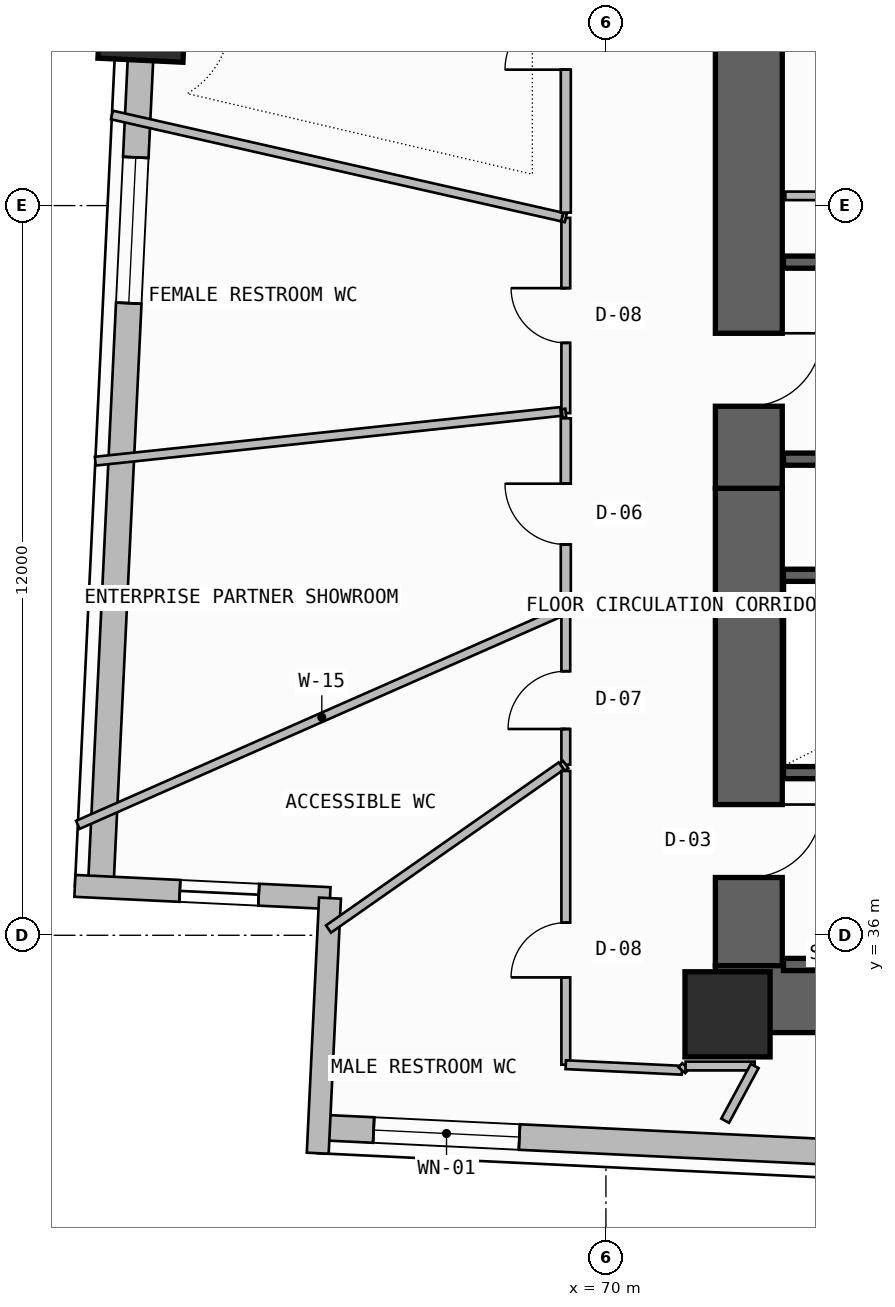
"""IFC4 building model, lengths in metres.
Left out: names, types, materials, properties, quantities, classifications, styles, units other than length and angle.
Written with IfcOpenShell. Run it as: python <this file> out.ifc"""

import sys

from ifc_helpers import new_model, si_unit, direction, frame, frame_2d, origin, origin_2d, place, context, subcontext, project, spatial, rectangle, extrude, element, fill, save


model = new_model("IFC4")
c1 = context("Model", 3, precision=1e-05, world=origin(), true_north=direction((0.0, 1.0)))
c2 = subcontext(c1, "Body", "Model", "MODEL_VIEW")
j1 = project(units=[si_unit("LENGTHUNIT", "METRE"), si_unit("PLANEANGLEUNIT", "RADIAN")], contexts=[c1])
p1 = place(None, origin())
s1 = spatial("IfcSite", under=j1, at=p1, CompositionType="ELEMENT")
p2 = place(p1, origin())
s2 = spatial("IfcBuilding", under=s1, at=p2, CompositionType="ELEMENT")
p3 = place(p2, frame((0.0, 0.0, 44.7)))
s3 = spatial("IfcBuildingStorey", under=s2, at=p3, CompositionType="ELEMENT", Elevation=44.7)
p4 = place(p3, frame((72.35, 35.5, -0.2), z_axis=(0.0, 0.0, 1.0), x_axis=(0.0, 1.0, 0.0)))
e1 = element("IfcWall", 1, at=p4, inside=s3, PredefinedType="SHEAR", context=c2, shape_type="SweptSolid", body=[
    extrude(rectangle(XDim=7.85, YDim=1.1, at=frame_2d((3.925, 0.0))), origin(), (0.0, 0.0, 1.0), 3.54),
])
p5 = place(p4, frame((1.45, 0.0, 0.2)))
e2 = element("IfcOpeningElement", 2, at=p5, cuts=e1, PredefinedType="OPENING", context=c2, shape_type="SweptSolid", body=[
    extrude(rectangle(XDim=1.2, YDim=2.2, at=frame_2d((0.6, 1.1))), frame((0.0, 0.56, 0.0), z_axis=(0.0, -1.0, 0.0), x_axis=(1.0, 0.0, 0.0)), (0.0, 0.0, 1.0), 1.12),
])
p6 = place(p3, frame((71.8, 34.95, -0.2), z_axis=(0.0, 0.0, 1.0), x_axis=(1.0, 0.0, 0.0)))
e3 = element("IfcWall", 3, at=p6, inside=s3, PredefinedType="SHEAR", context=c2, shape_type="SweptSolid", body=[
    extrude(rectangle(XDim=14.3, YDim=1.1, at=frame_2d((7.15, 0.0))), origin(), (0.0, 0.0, 1.0), 3.54),
])
p7 = place(p3, frame((72.35, 43.35, -0.2), z_axis=(0.0, 0.0, 1.0), x_axis=(0.0, 1.0, 0.0)))
e4 = element("IfcWall", 4, at=p7, inside=s3, PredefinedType="SHEAR", context=c2, shape_type="SweptSolid", body=[
    extrude(rectangle(XDim=12.7, YDim=1.1, at=frame_2d((6.35, 0.0))), origin(), (0.0, 0.0, 1.0), 3.54),
])
p8 = place(p7, frame((1.35, 0.0, 0.2)))
e5 = element("IfcOpeningElement", 5, at=p8, cuts=e4, PredefinedType="OPENING", context=c2, shape_type="SweptSolid", body=[
    extrude(rectangle(XDim=1.2, YDim=2.2, at=frame_2d((0.6, 1.1))), frame((0.0, 0.56, 0.0), z_axis=(0.0, -1.0, 0.0), x_axis=(1.0, 0.0, 0.0)), (0.0, 0.0, 1.0), 1.12),
])
for number, where, z_axis, x_axis in (
    (6, (72.0, 34.7, 0.0), (0.0, 0.0, 1.0), (1.0, 0.0, 0.0)),
    (7, (62.378, 51.09, 0.0), (0.0, 0.0, 1.0), (0.048, 0.999, 0.0)),
):
    element("IfcColumn", number, at=place(p3, frame(where, z_axis=z_axis, x_axis=x_axis)), inside=s3, PredefinedType="COLUMN", context=c2, shape_type="SweptSolid", body=[
        extrude(rectangle(XDim=1.4, YDim=1.4, at=origin_2d()), origin(), (0.0, 0.0, 1.0), 3.6),
    ])
p9 = place(p3, frame((65.281, 32.841, 0.0), z_axis=(0.0, 0.0, 1.0), x_axis=(0.998848298084, -0.047979968897, 0.0)))
e8 = element("IfcWall", 8, at=p9, inside=s3, PredefinedType="SOLIDWALL", context=c2, shape_type="SweptSolid", body=[
    extrude(rectangle(XDim=17.952, YDim=0.42, at=frame_2d((8.976, 0.0))), origin(), (0.0, 0.0, 1.0), 2.325),
])
p10 = place(p9, frame((0.9, 0.0, 1.2)))
e9 = element("IfcOpeningElement", 9, at=p10, cuts=e8, PredefinedType="OPENING", context=c2, shape_type="SweptSolid", body=[
    extrude(rectangle(XDim=2.4, YDim=0.9, at=frame_2d((1.2, 0.45))), frame((0.0, 0.22, 0.0), z_axis=(0.0, -1.0, 0.0), x_axis=(1.0, 0.0, 0.0)), (0.0, 0.0, 1.0), 0.44),
])
p11 = place(p3, frame((62.378, 51.09, 0.0), z_axis=(0.0, 0.0, 1.0), x_axis=(-0.047978424452, -0.99884837227, 0.0)))
e10 = element("IfcWall", 10, at=p11, inside=s3, PredefinedType="SOLIDWALL", context=c2, shape_type="SweptSolid", body=[
    extrude(rectangle(XDim=14.314, YDim=0.42, at=frame_2d((7.157, 0.0))), origin(), (0.0, 0.0, 1.0), 2.325),
])
p12 = place(p11, frame((2.3, 0.0, 1.2)))
e11 = element("IfcOpeningElement", 11, at=p12, cuts=e10, PredefinedType="OPENING", context=c2, shape_type="SweptSolid", body=[
    extrude(rectangle(XDim=2.4, YDim=0.9, at=frame_2d((1.2, 0.45))), frame((0.0, 0.22, 0.0), z_axis=(0.0, -1.0, 0.0), x_axis=(1.0, 0.0, 0.0)), (0.0, 0.0, 1.0), 0.44),
])
p13 = place(p3, frame((61.267, 36.812, 0.0), z_axis=(0.0, 0.0, 1.0), x_axis=(0.998849519138, -0.047954542207, 0.0)))
e12 = element("IfcWall", 12, at=p13, inside=s3, PredefinedType="SOLIDWALL", context=c2, shape_type="SweptSolid", body=[
    extrude(rectangle(XDim=4.2, YDim=0.36, at=frame_2d((2.1, 0.0))), origin(), (0.0, 0.0, 1.0), 3.34),
])
p14 = place(p13, frame((1.728, 0.0, 0.45)))
e13 = element("IfcOpeningElement", 13, at=p14, cuts=e12, PredefinedType="OPENING", context=c2, shape_type="SweptSolid", body=[
    extrude(rectangle(XDim=1.3, YDim=2.4, at=frame_2d((0.65, 1.2))), frame((0.0, 0.19, 0.0), z_axis=(0.0, -1.0, 0.0), x_axis=(1.0, 0.0, 0.0)), (0.0, 0.0, 1.0), 0.38),
])
p15 = place(p3, frame((65.462, 36.611, 0.0), z_axis=(0.0, 0.0, 1.0), x_axis=(-0.048015322758, -0.998846599224, 0.0)))
e14 = element("IfcWall", 14, at=p15, inside=s3, PredefinedType="SOLIDWALL", context=c2, shape_type="SweptSolid", body=[
    extrude(rectangle(XDim=4.2, YDim=0.36, at=frame_2d((2.1, 0.0))), origin(), (0.0, 0.0, 1.0), 3.34),
])
for number, where, z_axis, x_axis in (
    (15, (72.92, 35.52, -0.2), (0.0, 0.0, 1.0), (1.0, 0.0, 0.0)),
    (16, (72.92, 38.675, -0.2), (0.0, 0.0, 1.0), (1.0, 0.0, 0.0)),
):
    element("IfcWall", number, at=place(p3, frame(where, z_axis=z_axis, x_axis=x_axis)), inside=s3, PredefinedType="SOLIDWALL", context=c2, shape_type="SweptSolid", body=[
        extrude(rectangle(XDim=7.7, YDim=0.2, at=frame_2d((3.85, 0.0))), origin(), (0.0, 0.0, 1.0), 3.54),
    ])
p16 = place(p3, frame((72.92, 41.92, -0.2), z_axis=(0.0, 0.0, 1.0), x_axis=(1.0, 0.0, 0.0)))
e17 = element("IfcWall", 17, at=p16, inside=s3, PredefinedType="SOLIDWALL", context=c2, shape_type="SweptSolid", body=[
    extrude(rectangle(XDim=7.58, YDim=0.2, at=frame_2d((3.79, 0.0))), origin(), (0.0, 0.0, 1.0), 3.54),
])
for number, where, z_axis, x_axis in (
    (18, (72.92, 43.83, -0.2), (0.0, 0.0, 1.0), (1.0, 0.0, 0.0)),
    (19, (72.92, 47.07, -0.2), (0.0, 0.0, 1.0), (1.0, 0.0, 0.0)),
):
    element("IfcWall", number, at=place(p3, frame(where, z_axis=z_axis, x_axis=x_axis)), inside=s3, PredefinedType="SOLIDWALL", context=c2, shape_type="SweptSolid", body=[
        extrude(rectangle(XDim=7.7, YDim=0.2, at=frame_2d((3.85, 0.0))), origin(), (0.0, 0.0, 1.0), 3.54),
    ])
p17 = place(p3, frame((72.95, 48.16, 0.0), z_axis=(0.0, 0.0, 1.0), x_axis=(1.0, 0.0, 0.0)))
e20 = element("IfcWall", 20, at=p17, inside=s3, PredefinedType="PLUMBINGWALL", context=c2, shape_type="SweptSolid", body=[
    extrude(rectangle(XDim=3.24, YDim=0.14, at=frame_2d((1.62, 0.0))), origin(), (0.0, 0.0, 1.0), 3.34),
])
p18 = place(p3, frame((69.34, 47.798, 0.0), z_axis=(0.0, 0.0, 1.0), x_axis=(0.0, -1.0, 0.0)))
e21 = element("IfcWall", 21, at=p18, inside=s3, PredefinedType="PARTITIONING", context=c2, shape_type="SweptSolid", body=[
    extrude(rectangle(XDim=3.211, YDim=0.145, at=frame_2d((1.605, 0.0))), origin(), (0.0, 0.0, 1.0), 3.34),
])
p19 = place(p18, frame((1.156, 0.0, 0.0)))
e22 = element("IfcOpeningElement", 22, at=p19, cuts=e21, PredefinedType="OPENING", context=c2, shape_type="SweptSolid", body=[
    extrude(rectangle(XDim=0.9, YDim=2.1, at=frame_2d((0.45, 1.05))), frame((0.0, 0.083, 0.0), z_axis=(0.0, -1.0, 0.0), x_axis=(1.0, 0.0, 0.0)), (0.0, 0.0, 1.0), 0.165),
])
p20 = place(p3, frame((69.28, 47.812, 0.0), z_axis=(0.0, 0.0, 1.0), x_axis=(0.974190578374, -0.225727085233, 0.0)))
e23 = element("IfcWall", 23, at=p20, inside=s3, PredefinedType="PARTITIONING", context=c2, shape_type="SweptSolid", body=[
    extrude(rectangle(XDim=0.062, YDim=0.145, at=frame_2d((0.031, 0.0))), origin(), (0.0, 0.0, 1.0), 3.34),
])
p21 = place(p3, frame((69.34, 44.587, 0.0), z_axis=(0.0, 0.0, 1.0), x_axis=(-0.994030677348, -0.109100928002, 0.0)))
e24 = element("IfcWall", 24, at=p21, inside=s3, PredefinedType="PARTITIONING", context=c2, shape_type="SweptSolid", body=[
    extrude(rectangle(XDim=0.06, YDim=0.145, at=frame_2d((0.03, 0.0))), origin(), (0.0, 0.0, 1.0), 3.34),
])
p22 = place(p3, frame((69.256, 44.614, 0.0), z_axis=(0.0, 0.0, 1.0), x_axis=(-0.994351793686, -0.106134397782, 0.0)))
e25 = element("IfcWall", 25, at=p22, inside=s3, PredefinedType="PARTITIONING", context=c2, shape_type="SweptSolid", body=[
    extrude(rectangle(XDim=7.697, YDim=0.145, at=frame_2d((3.848, 0.0))), origin(), (0.0, 0.0, 1.0), 3.34),
])
p23 = place(p3, frame((61.875, 49.49, 0.0), z_axis=(0.0, 0.0, 1.0), x_axis=(0.975255899725, -0.221079013143, 0.0)))
e26 = element("IfcWall", 26, at=p23, inside=s3, PredefinedType="PARTITIONING", context=c2, shape_type="SweptSolid", body=[
    extrude(rectangle(XDim=7.592, YDim=0.145, at=frame_2d((3.796, 0.0))), origin(), (0.0, 0.0, 1.0), 3.34),
])
p24 = place(p3, frame((69.34, 44.502, 0.0), z_axis=(0.0, 0.0, 1.0), x_axis=(0.0, -1.0, 0.0)))
e27 = element("IfcWall", 27, at=p24, inside=s3, PredefinedType="PARTITIONING", context=c2, shape_type="SweptSolid", body=[
    extrude(rectangle(XDim=3.15, YDim=0.165, at=frame_2d((1.575, 0.0))), origin(), (0.0, 0.0, 1.0), 3.34),
])
p25 = place(p24, frame((1.075, 0.0, 0.0)))
e28 = element("IfcOpeningElement", 28, at=p25, cuts=e27, PredefinedType="OPENING", context=c2, shape_type="SweptSolid", body=[
    extrude(rectangle(XDim=1.0, YDim=2.2, at=frame_2d((0.5, 1.1))), frame((0.0, 0.093, 0.0), z_axis=(0.0, -1.0, 0.0), x_axis=(1.0, 0.0, 0.0)), (0.0, 0.0, 1.0), 0.185),
])
p26 = place(p3, frame((69.34, 41.352, 0.0), z_axis=(0.0, 0.0, 1.0), x_axis=(-0.915112128414, -0.403199444976, 0.0)))
e29 = element("IfcWall", 29, at=p26, inside=s3, PredefinedType="PARTITIONING", context=c2, shape_type="SweptSolid", body=[
    extrude(rectangle(XDim=8.77, YDim=0.145, at=frame_2d((4.385, 0.0))), origin(), (0.0, 0.0, 1.0), 3.34),
])
p27 = place(p3, frame((69.34, 41.26, 0.0), z_axis=(0.0, 0.0, 1.0), x_axis=(0.0, -1.0, 0.0)))
e30 = element("IfcWall", 30, at=p27, inside=s3, PredefinedType="PARTITIONING", context=c2, shape_type="SweptSolid", body=[
    extrude(rectangle(XDim=2.454, YDim=0.145, at=frame_2d((1.227, 0.0))), origin(), (0.0, 0.0, 1.0), 3.34),
])
p28 = place(p27, frame((0.917, 0.0, 0.0)))
e31 = element("IfcOpeningElement", 31, at=p28, cuts=e30, PredefinedType="OPENING", context=c2, shape_type="SweptSolid", body=[
    extrude(rectangle(XDim=0.95, YDim=2.15, at=frame_2d((0.475, 1.075))), frame((0.0, 0.083, 0.0), z_axis=(0.0, -1.0, 0.0), x_axis=(1.0, 0.0, 0.0)), (0.0, 0.0, 1.0), 0.165),
])
p29 = place(p3, frame((69.34, 38.806, 0.0), z_axis=(0.0, 0.0, 1.0), x_axis=(-0.811722058131, -0.584043919875, 0.0)))
e32 = element("IfcWall", 32, at=p29, inside=s3, PredefinedType="PARTITIONING", context=c2, shape_type="SweptSolid", body=[
    extrude(rectangle(XDim=0.074, YDim=0.145, at=frame_2d((0.037, 0.0))), origin(), (0.0, 0.0, 1.0), 3.34),
])
p30 = place(p3, frame((69.265, 38.784, 0.0), z_axis=(0.0, 0.0, 1.0), x_axis=(-0.8190576131, -0.573711274443, 0.0)))
e33 = element("IfcWall", 33, at=p30, inside=s3, PredefinedType="PARTITIONING", context=c2, shape_type="SweptSolid", body=[
    extrude(rectangle(XDim=4.673, YDim=0.145, at=frame_2d((2.336, 0.0))), origin(), (0.0, 0.0, 1.0), 3.34),
])
p31 = place(p3, frame((69.34, 38.702, 0.0), z_axis=(0.0, 0.0, 1.0), x_axis=(0.0, -1.0, 0.0)))
e34 = element("IfcWall", 34, at=p31, inside=s3, PredefinedType="PARTITIONING", context=c2, shape_type="SweptSolid", body=[
    extrude(rectangle(XDim=4.83, YDim=0.145, at=frame_2d((2.415, 0.0))), origin(), (0.0, 0.0, 1.0), 3.34),
])
p32 = place(p31, frame((2.494, 0.0, 0.0)))
e35 = element("IfcOpeningElement", 35, at=p32, cuts=e34, PredefinedType="OPENING", context=c2, shape_type="SweptSolid", body=[
    extrude(rectangle(XDim=0.9, YDim=2.1, at=frame_2d((0.45, 1.05))), frame((0.0, 0.083, 0.0), z_axis=(0.0, -1.0, 0.0), x_axis=(1.0, 0.0, 0.0)), (0.0, 0.0, 1.0), 0.165),
])
p33 = place(p3, frame((69.34, 33.872, 0.0), z_axis=(0.0, 0.0, 1.0), x_axis=(0.998853066551, -0.047880595674, 0.0)))
e36 = element("IfcWall", 36, at=p33, inside=s3, PredefinedType="PARTITIONING", context=c2, shape_type="SweptSolid", body=[
    extrude(rectangle(XDim=1.912, YDim=0.145, at=frame_2d((0.956, 0.0))), origin(), (0.0, 0.0, 1.0), 3.34),
])
p34 = place(p3, frame((71.25, 33.78, 0.0), z_axis=(0.0, 0.0, 1.0), x_axis=(0.652100218984, 0.758132774916, 0.0)))
e37 = element("IfcWall", 37, at=p34, inside=s3, PredefinedType="PARTITIONING", context=c2, shape_type="SweptSolid", body=[
    extrude(rectangle(XDim=0.092, YDim=0.145, at=frame_2d((0.046, 0.0))), origin(), (0.0, 0.0, 1.0), 3.34),
])
p35 = place(p3, frame((69.34, 59.06, 0.0), z_axis=(0.0, 0.0, 1.0), x_axis=(0.0, -1.0, 0.0)))
e38 = element("IfcWall", 38, at=p35, inside=s3, PredefinedType="PARTITIONING", context=c2, shape_type="SweptSolid", body=[
    extrude(rectangle(XDim=11.176, YDim=0.165, at=frame_2d((5.588, 0.0))), origin(), (0.0, 0.0, 1.0), 2.725),
])
p36 = place(p35, frame((7.825, 0.0, 0.0)))
e39 = element("IfcOpeningElement", 39, at=p36, cuts=e38, PredefinedType="OPENING", context=c2, shape_type="SweptSolid", body=[
    extrude(rectangle(XDim=1.0, YDim=2.2, at=frame_2d((0.5, 1.1))), frame((0.0, 0.093, 0.0), z_axis=(0.0, -1.0, 0.0), x_axis=(1.0, 0.0, 0.0)), (0.0, 0.0, 1.0), 0.185),
])
p37 = place(p3, frame((71.31, 33.85, 0.0), z_axis=(0.0, 0.0, 1.0), x_axis=(1.0, 0.0, 0.0)))
e40 = element("IfcWall", 40, at=p37, inside=s3, PredefinedType="PARTITIONING", context=c2, shape_type="SweptSolid", body=[
    extrude(rectangle(XDim=1.136, YDim=0.145, at=frame_2d((0.568, 0.0))), origin(), (0.0, 0.0, 1.0), 3.34),
])
p38 = place(p3, frame((72.446, 33.85, 0.0), z_axis=(0.0, 0.0, 1.0), x_axis=(-0.474697762924, -0.880148870291, 0.0)))
e41 = element("IfcWall", 41, at=p38, inside=s3, PredefinedType="PARTITIONING", context=c2, shape_type="SweptSolid", body=[
    extrude(rectangle(XDim=1.022, YDim=0.145, at=frame_2d((0.511, 0.0))), origin(), (0.0, 0.0, 1.0), 3.34),
])
p39 = place(p10, origin())
e42 = element("IfcWindow", 42, at=p39, inside=s3, PartitioningType="SINGLE_PANEL", PredefinedType="WINDOW", context=c2, shape_type="SweptSolid", body=[
    extrude(rectangle(XDim=2.4, YDim=0.9, at=frame_2d((1.2, 0.45))), frame((0.0, 0.03, 0.0), z_axis=(0.0, -1.0, 0.0), x_axis=(1.0, 0.0, 0.0)), (0.0, 0.0, 1.0), 0.06),
])
fill(e9, e42)
p40 = place(p12, origin())
e43 = element("IfcWindow", 43, at=p40, inside=s3, PartitioningType="SINGLE_PANEL", PredefinedType="WINDOW", context=c2, shape_type="SweptSolid", body=[
    extrude(rectangle(XDim=2.4, YDim=0.9, at=frame_2d((1.2, 0.45))), frame((0.0, 0.03, 0.0), z_axis=(0.0, -1.0, 0.0), x_axis=(1.0, 0.0, 0.0)), (0.0, 0.0, 1.0), 0.06),
])
fill(e11, e43)
p41 = place(p14, origin())
e44 = element("IfcWindow", 44, at=p41, inside=s3, PartitioningType="SINGLE_PANEL", PredefinedType="WINDOW", context=c2, shape_type="SweptSolid", body=[
    extrude(rectangle(XDim=1.3, YDim=2.4, at=frame_2d((0.65, 1.2))), frame((0.0, 0.03, 0.0), z_axis=(0.0, -1.0, 0.0), x_axis=(1.0, 0.0, 0.0)), (0.0, 0.0, 1.0), 0.06),
])
fill(e13, e44)
p42 = place(p5, frame((1.2, 0.0, 0.0), z_axis=(0.0, 0.0, 1.0), x_axis=(-1.0, 0.0, 0.0)))
e45 = element("IfcDoor", 45, at=p42, inside=s3, OperationType="SINGLE_SWING_LEFT", PredefinedType="USERDEFINED", context=c2, shape_type="SweptSolid", body=[
    extrude(rectangle(XDim=1.2, YDim=2.2, at=frame_2d((0.6, 1.1))), frame((0.0, 0.025, 0.0), z_axis=(0.0, -1.0, 0.0), x_axis=(1.0, 0.0, 0.0)), (0.0, 0.0, 1.0), 0.05),
])
fill(e2, e45)
p43 = place(p8, frame((1.2, 0.0, 0.0), z_axis=(0.0, 0.0, 1.0), x_axis=(-1.0, 0.0, 0.0)))
e46 = element("IfcDoor", 46, at=p43, inside=s3, OperationType="SINGLE_SWING_LEFT", PredefinedType="USERDEFINED", context=c2, shape_type="SweptSolid", body=[
    extrude(rectangle(XDim=1.2, YDim=2.2, at=frame_2d((0.6, 1.1))), frame((0.0, 0.025, 0.0), z_axis=(0.0, -1.0, 0.0), x_axis=(1.0, 0.0, 0.0)), (0.0, 0.0, 1.0), 0.05),
])
fill(e5, e46)
p44 = place(p19, frame((0.9, 0.0, 0.0), z_axis=(0.0, 0.0, 1.0), x_axis=(-1.0, 0.0, 0.0)))
e47 = element("IfcDoor", 47, at=p44, inside=s3, OperationType="SINGLE_SWING_RIGHT", PredefinedType="DOOR", context=c2, shape_type="SweptSolid", body=[
    extrude(rectangle(XDim=0.9, YDim=2.1, at=frame_2d((0.45, 1.05))), frame((0.0, 0.025, 0.0), z_axis=(0.0, -1.0, 0.0), x_axis=(1.0, 0.0, 0.0)), (0.0, 0.0, 1.0), 0.05),
])
fill(e22, e47)
p45 = place(p25, frame((1.0, 0.0, 0.0), z_axis=(0.0, 0.0, 1.0), x_axis=(-1.0, 0.0, 0.0)))
e48 = element("IfcDoor", 48, at=p45, inside=s3, OperationType="SINGLE_SWING_RIGHT", PredefinedType="DOOR", context=c2, shape_type="SweptSolid", body=[
    extrude(rectangle(XDim=1.0, YDim=2.2, at=frame_2d((0.5, 1.1))), frame((0.0, 0.025, 0.0), z_axis=(0.0, -1.0, 0.0), x_axis=(1.0, 0.0, 0.0)), (0.0, 0.0, 1.0), 0.05),
])
fill(e28, e48)
p46 = place(p28, frame((0.95, 0.0, 0.0), z_axis=(0.0, 0.0, 1.0), x_axis=(-1.0, 0.0, 0.0)))
e49 = element("IfcDoor", 49, at=p46, inside=s3, OperationType="SINGLE_SWING_LEFT", PredefinedType="DOOR", context=c2, shape_type="SweptSolid", body=[
    extrude(rectangle(XDim=0.95, YDim=2.15, at=frame_2d((0.475, 1.075))), frame((0.0, 0.025, 0.0), z_axis=(0.0, -1.0, 0.0), x_axis=(1.0, 0.0, 0.0)), (0.0, 0.0, 1.0), 0.05),
])
fill(e31, e49)
p47 = place(p32, frame((0.9, 0.0, 0.0), z_axis=(0.0, 0.0, 1.0), x_axis=(-1.0, 0.0, 0.0)))
e50 = element("IfcDoor", 50, at=p47, inside=s3, OperationType="SINGLE_SWING_LEFT", PredefinedType="DOOR", context=c2, shape_type="SweptSolid", body=[
    extrude(rectangle(XDim=0.9, YDim=2.1, at=frame_2d((0.45, 1.05))), frame((0.0, 0.025, 0.0), z_axis=(0.0, -1.0, 0.0), x_axis=(1.0, 0.0, 0.0)), (0.0, 0.0, 1.0), 0.05),
])
fill(e35, e50)
p48 = place(p36, frame((1.0, 0.0, 0.0), z_axis=(0.0, 0.0, 1.0), x_axis=(-1.0, 0.0, 0.0)))
e51 = element("IfcDoor", 51, at=p48, inside=s3, OperationType="SINGLE_SWING_LEFT", PredefinedType="DOOR", context=c2, shape_type="SweptSolid", body=[
    extrude(rectangle(XDim=1.0, YDim=2.2, at=frame_2d((0.5, 1.1))), frame((0.0, 0.025, 0.0), z_axis=(0.0, -1.0, 0.0), x_axis=(1.0, 0.0, 0.0)), (0.0, 0.0, 1.0), 0.05),
])
fill(e39, e51)
save(model, sys.argv[1])
